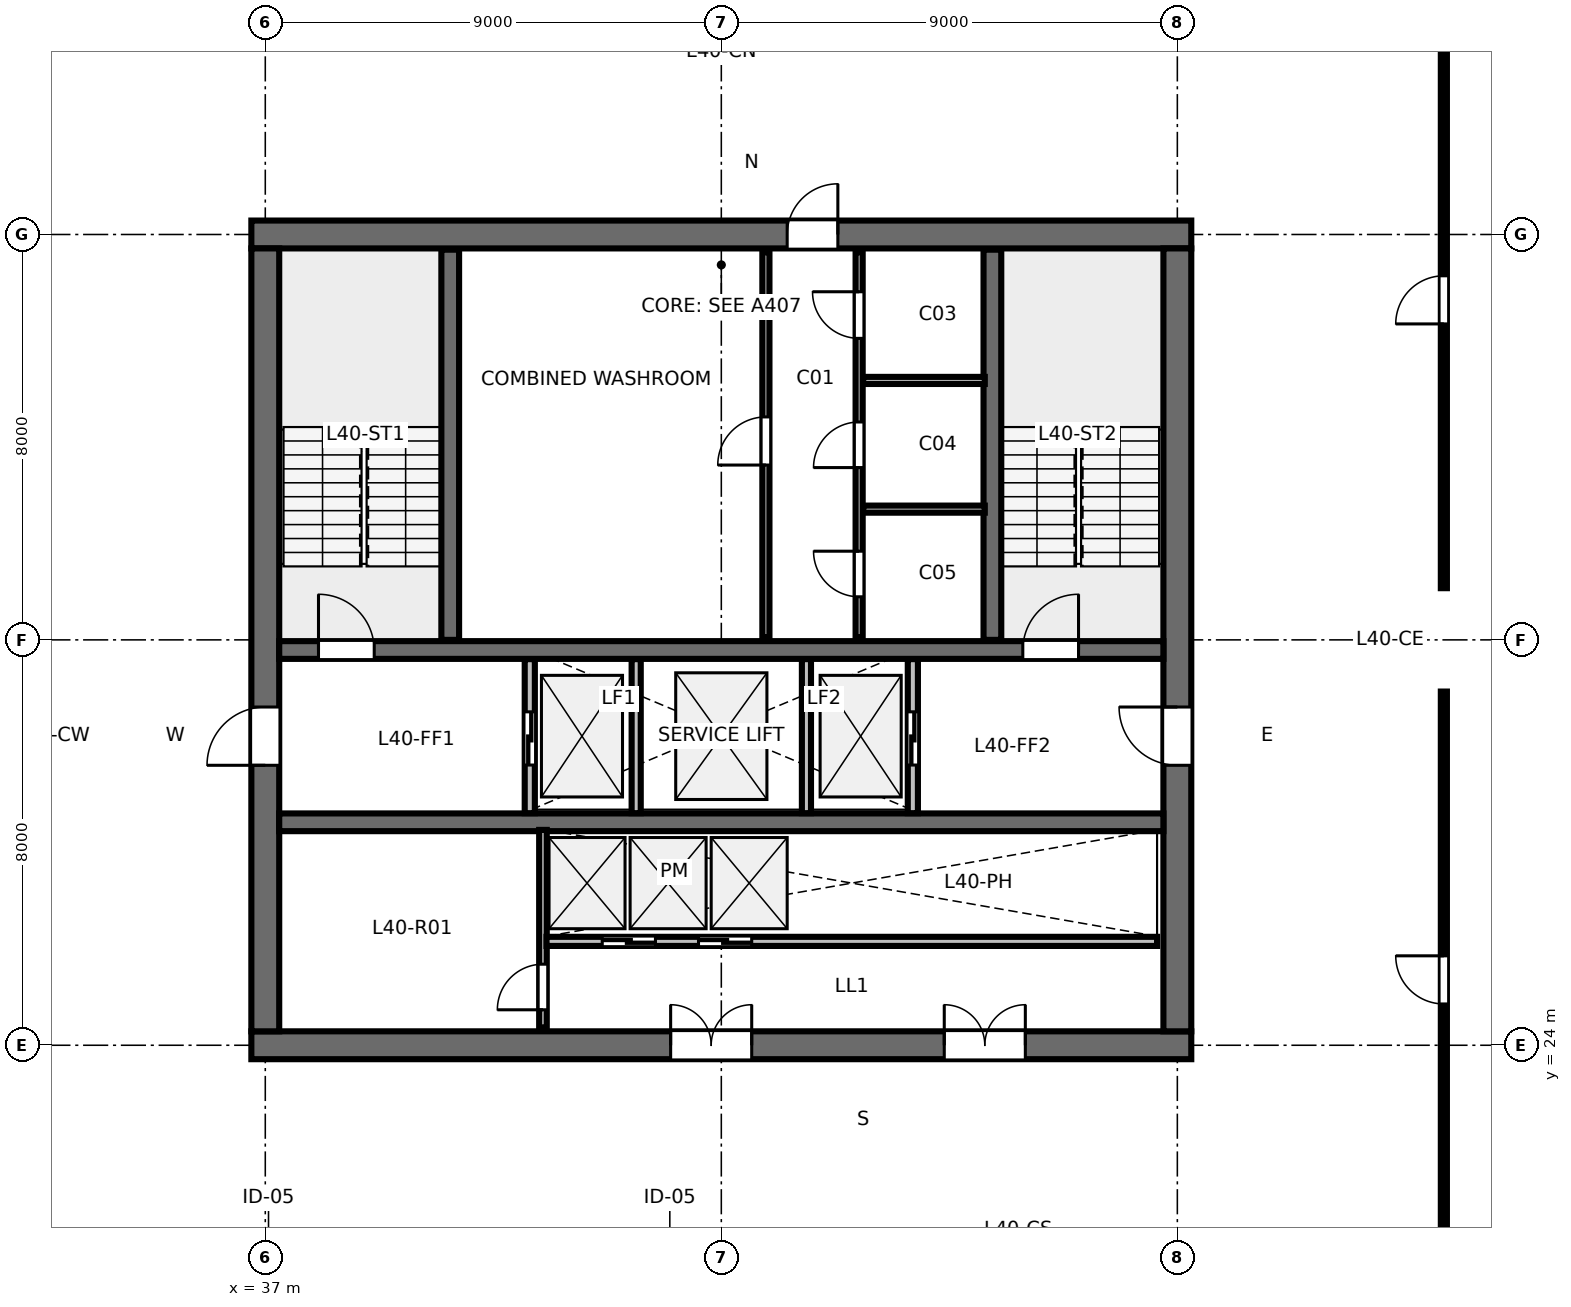
"""IFC4 building model, lengths in metres.
Left out: names, types, materials, properties, quantities, classifications, styles, units other than length and angle.
Written with IfcOpenShell. Run it as: python <this file> out.ifc"""

import sys

from ifc_helpers import new_model, si_unit, direction, frame, frame_2d, origin, place, context, subcontext, project, spatial, rectangle, extrude, element, fill, save


model = new_model("IFC4")
c1 = context("Model", 3, precision=1e-05, world=origin(), true_north=direction((0.0, 1.0)))
c2 = subcontext(c1, "Body", "Model", "MODEL_VIEW")
j1 = project(units=[si_unit("LENGTHUNIT", "METRE"), si_unit("PLANEANGLEUNIT", "RADIAN")], contexts=[c1])
p1 = place(None, origin())
s1 = spatial("IfcSite", under=j1, at=p1, CompositionType="ELEMENT")
p2 = place(p1, origin())
s2 = spatial("IfcBuilding", under=s1, at=p2, CompositionType="ELEMENT")
p3 = place(p2, frame((0.0, 0.0, 152.8)))
s3 = spatial("IfcBuildingStorey", under=s2, at=p3, CompositionType="ELEMENT", Elevation=152.8)
p4 = place(p3, frame((36.725, 24.0, 0.0), z_axis=(0.0, 0.0, 1.0), x_axis=(1.0, 0.0, 0.0)))
e1 = element("IfcWall", 1, at=p4, inside=s3, PredefinedType="SHEAR", context=c2, shape_type="SweptSolid", body=[
    extrude(rectangle(XDim=18.55, YDim=0.55, at=frame_2d((9.275, 0.0))), origin(), (0.0, 0.0, 1.0), 3.36),
])
p5 = place(p4, frame((8.275, 0.0, 0.0)))
e2 = element("IfcOpeningElement", 2, at=p5, cuts=e1, PredefinedType="OPENING", context=c2, shape_type="SweptSolid", body=[
    extrude(rectangle(XDim=1.6, YDim=2.15, at=frame_2d((0.8, 1.075))), frame((0.0, 0.285, 0.0), z_axis=(0.0, -1.0, 0.0), x_axis=(1.0, 0.0, 0.0)), (0.0, 0.0, 1.0), 0.57),
])
p6 = place(p4, frame((13.675, 0.0, 0.0)))
e3 = element("IfcOpeningElement", 3, at=p6, cuts=e1, PredefinedType="OPENING", context=c2, shape_type="SweptSolid", body=[
    extrude(rectangle(XDim=1.6, YDim=2.15, at=frame_2d((0.8, 1.075))), frame((0.0, 0.285, 0.0), z_axis=(0.0, -1.0, 0.0), x_axis=(1.0, 0.0, 0.0)), (0.0, 0.0, 1.0), 0.57),
])
p7 = place(p3, frame((36.725, 40.0, 0.0), z_axis=(0.0, 0.0, 1.0), x_axis=(1.0, 0.0, 0.0)))
e4 = element("IfcWall", 4, at=p7, inside=s3, PredefinedType="SHEAR", context=c2, shape_type="SweptSolid", body=[
    extrude(rectangle(XDim=18.55, YDim=0.55, at=frame_2d((9.275, 0.0))), origin(), (0.0, 0.0, 1.0), 3.36),
])
p8 = place(p7, frame((10.575, 0.0, 0.0)))
e5 = element("IfcOpeningElement", 5, at=p8, cuts=e4, PredefinedType="OPENING", context=c2, shape_type="SweptSolid", body=[
    extrude(rectangle(XDim=1.0, YDim=2.15, at=frame_2d((0.5, 1.075))), frame((0.0, 0.285, 0.0), z_axis=(0.0, -1.0, 0.0), x_axis=(1.0, 0.0, 0.0)), (0.0, 0.0, 1.0), 0.57),
])
p9 = place(p3, frame((37.0, 24.275, 0.0), z_axis=(0.0, 0.0, 1.0), x_axis=(0.0, 1.0, 0.0)))
e6 = element("IfcWall", 6, at=p9, inside=s3, PredefinedType="SHEAR", context=c2, shape_type="SweptSolid", body=[
    extrude(rectangle(XDim=15.45, YDim=0.55, at=frame_2d((7.725, 0.0))), origin(), (0.0, 0.0, 1.0), 3.36),
])
p10 = place(p9, frame((5.25, 0.0, 0.0)))
e7 = element("IfcOpeningElement", 7, at=p10, cuts=e6, PredefinedType="OPENING", context=c2, shape_type="SweptSolid", body=[
    extrude(rectangle(XDim=1.15, YDim=2.15, at=frame_2d((0.575, 1.075))), frame((0.0, 0.285, 0.0), z_axis=(0.0, -1.0, 0.0), x_axis=(1.0, 0.0, 0.0)), (0.0, 0.0, 1.0), 0.57),
])
p11 = place(p3, frame((55.0, 24.275, 0.0), z_axis=(0.0, 0.0, 1.0), x_axis=(0.0, 1.0, 0.0)))
e8 = element("IfcWall", 8, at=p11, inside=s3, PredefinedType="SHEAR", context=c2, shape_type="SweptSolid", body=[
    extrude(rectangle(XDim=15.45, YDim=0.55, at=frame_2d((7.725, 0.0))), origin(), (0.0, 0.0, 1.0), 3.36),
])
p12 = place(p11, frame((5.25, 0.0, 0.0)))
e9 = element("IfcOpeningElement", 9, at=p12, cuts=e8, PredefinedType="OPENING", context=c2, shape_type="SweptSolid", body=[
    extrude(rectangle(XDim=1.15, YDim=2.15, at=frame_2d((0.575, 1.075))), frame((0.0, 0.285, 0.0), z_axis=(0.0, -1.0, 0.0), x_axis=(1.0, 0.0, 0.0)), (0.0, 0.0, 1.0), 0.57),
])
p13 = place(p3, frame((37.275, 31.8, 0.0), z_axis=(0.0, 0.0, 1.0), x_axis=(1.0, 0.0, 0.0)))
e10 = element("IfcWall", 10, at=p13, inside=s3, PredefinedType="SHEAR", context=c2, shape_type="SweptSolid", body=[
    extrude(rectangle(XDim=17.45, YDim=0.35, at=frame_2d((8.725, 0.0))), origin(), (0.0, 0.0, 1.0), 3.36),
])
p14 = place(p13, frame((0.775, 0.0, 0.0)))
e11 = element("IfcOpeningElement", 11, at=p14, cuts=e10, PredefinedType="OPENING", context=c2, shape_type="SweptSolid", body=[
    extrude(rectangle(XDim=1.1, YDim=2.15, at=frame_2d((0.55, 1.075))), frame((0.0, 0.185, 0.0), z_axis=(0.0, -1.0, 0.0), x_axis=(1.0, 0.0, 0.0)), (0.0, 0.0, 1.0), 0.37),
])
p15 = place(p13, frame((14.675, 0.0, 0.0)))
e12 = element("IfcOpeningElement", 12, at=p15, cuts=e10, PredefinedType="OPENING", context=c2, shape_type="SweptSolid", body=[
    extrude(rectangle(XDim=1.1, YDim=2.15, at=frame_2d((0.55, 1.075))), frame((0.0, 0.185, 0.0), z_axis=(0.0, -1.0, 0.0), x_axis=(1.0, 0.0, 0.0)), (0.0, 0.0, 1.0), 0.37),
])
p16 = place(p3, frame((37.275, 28.4, 0.0), z_axis=(0.0, 0.0, 1.0), x_axis=(1.0, 0.0, 0.0)))
e13 = element("IfcWall", 13, at=p16, inside=s3, PredefinedType="SHEAR", context=c2, shape_type="SweptSolid", body=[
    extrude(rectangle(XDim=17.45, YDim=0.35, at=frame_2d((8.725, 0.0))), origin(), (0.0, 0.0, 1.0), 3.36),
])
for number, where, z_axis, x_axis in (
    (14, (40.65, 32.0, 0.0), (0.0, 0.0, 1.0), (0.0, 1.0, 0.0)),
    (15, (51.35, 32.0, 0.0), (0.0, 0.0, 1.0), (0.0, 1.0, 0.0)),
):
    element("IfcWall", number, at=place(p3, frame(where, z_axis=z_axis, x_axis=x_axis)), inside=s3, PredefinedType="SHEAR", context=c2, shape_type="SweptSolid", body=[
        extrude(rectangle(XDim=7.7, YDim=0.35, at=frame_2d((3.85, 0.0))), origin(), (0.0, 0.0, 1.0), 3.6),
    ])
p17 = place(p3, frame((46.88, 32.05, 0.0), z_axis=(0.0, 0.0, 1.0), x_axis=(0.0, 1.0, 0.0)))
e16 = element("IfcWall", 16, at=p17, inside=s3, PredefinedType="PARTITIONING", context=c2, shape_type="SweptSolid", body=[
    extrude(rectangle(XDim=7.6, YDim=0.14, at=frame_2d((3.8, 0.0))), origin(), (0.0, 0.0, 1.0), 3.36),
])
p18 = place(p17, frame((3.4, 0.0, 0.0)))
e17 = element("IfcOpeningElement", 17, at=p18, cuts=e16, PredefinedType="OPENING", context=c2, shape_type="SweptSolid", body=[
    extrude(rectangle(XDim=0.95, YDim=2.15, at=frame_2d((0.475, 1.075))), frame((0.0, 0.08, 0.0), z_axis=(0.0, -1.0, 0.0), x_axis=(1.0, 0.0, 0.0)), (0.0, 0.0, 1.0), 0.16),
])
p19 = place(p3, frame((48.72, 32.05, 0.0), z_axis=(0.0, 0.0, 1.0), x_axis=(0.0, 1.0, 0.0)))
e18 = element("IfcWall", 18, at=p19, inside=s3, PredefinedType="PARTITIONING", context=c2, shape_type="SweptSolid", body=[
    extrude(rectangle(XDim=7.6, YDim=0.14, at=frame_2d((3.8, 0.0))), origin(), (0.0, 0.0, 1.0), 3.36),
])
p20 = place(p19, frame((0.8, 0.0, 0.0)))
e19 = element("IfcOpeningElement", 19, at=p20, cuts=e18, PredefinedType="OPENING", context=c2, shape_type="SweptSolid", body=[
    extrude(rectangle(XDim=0.9, YDim=2.15, at=frame_2d((0.45, 1.075))), frame((0.0, 0.08, 0.0), z_axis=(0.0, -1.0, 0.0), x_axis=(1.0, 0.0, 0.0)), (0.0, 0.0, 1.0), 0.16),
])
p21 = place(p19, frame((3.35, 0.0, 0.0)))
e20 = element("IfcOpeningElement", 20, at=p21, cuts=e18, PredefinedType="OPENING", context=c2, shape_type="SweptSolid", body=[
    extrude(rectangle(XDim=0.9, YDim=2.15, at=frame_2d((0.45, 1.075))), frame((0.0, 0.08, 0.0), z_axis=(0.0, -1.0, 0.0), x_axis=(1.0, 0.0, 0.0)), (0.0, 0.0, 1.0), 0.16),
])
p22 = place(p19, frame((5.9, 0.0, 0.0)))
e21 = element("IfcOpeningElement", 21, at=p22, cuts=e18, PredefinedType="OPENING", context=c2, shape_type="SweptSolid", body=[
    extrude(rectangle(XDim=0.92, YDim=2.15, at=frame_2d((0.46, 1.075))), frame((0.0, 0.08, 0.0), z_axis=(0.0, -1.0, 0.0), x_axis=(1.0, 0.0, 0.0)), (0.0, 0.0, 1.0), 0.16),
])
for number, where, z_axis, x_axis in (
    (22, (48.8, 34.58, 0.0), (0.0, 0.0, 1.0), (1.0, 0.0, 0.0)),
    (23, (48.8, 37.12, 0.0), (0.0, 0.0, 1.0), (1.0, 0.0, 0.0)),
):
    element("IfcWall", number, at=place(p3, frame(where, z_axis=z_axis, x_axis=x_axis)), inside=s3, PredefinedType="PARTITIONING", context=c2, shape_type="SweptSolid", body=[
        extrude(rectangle(XDim=2.4, YDim=0.14, at=frame_2d((1.2, 0.0))), origin(), (0.0, 0.0, 1.0), 3.36),
    ])
p23 = place(p3, frame((42.22, 28.58, 0.0), z_axis=(0.0, 0.0, 1.0), x_axis=(0.0, 1.0, 0.0)))
e24 = element("IfcWall", 24, at=p23, inside=s3, PredefinedType="PARTITIONING", context=c2, shape_type="SweptSolid", body=[
    extrude(rectangle(XDim=3.04, YDim=0.2, at=frame_2d((1.52, 0.0))), origin(), (0.0, 0.0, 1.0), 3.36),
])
p24 = place(p23, frame((0.95, 0.0, 0.0)))
e25 = element("IfcOpeningElement", 25, at=p24, cuts=e24, PredefinedType="OPENING", context=c2, shape_type="SweptSolid", body=[
    extrude(rectangle(XDim=1.05, YDim=2.15, at=frame_2d((0.525, 1.075))), frame((0.0, 0.11, 0.0), z_axis=(0.0, -1.0, 0.0), x_axis=(1.0, 0.0, 0.0)), (0.0, 0.0, 1.0), 0.22),
])
p25 = place(p3, frame((49.78, 28.58, 0.0), z_axis=(0.0, 0.0, 1.0), x_axis=(0.0, 1.0, 0.0)))
e26 = element("IfcWall", 26, at=p25, inside=s3, PredefinedType="PARTITIONING", context=c2, shape_type="SweptSolid", body=[
    extrude(rectangle(XDim=3.04, YDim=0.2, at=frame_2d((1.52, 0.0))), origin(), (0.0, 0.0, 1.0), 3.36),
])
p26 = place(p25, frame((0.95, 0.0, 0.0)))
e27 = element("IfcOpeningElement", 27, at=p26, cuts=e26, PredefinedType="OPENING", context=c2, shape_type="SweptSolid", body=[
    extrude(rectangle(XDim=1.05, YDim=2.15, at=frame_2d((0.525, 1.075))), frame((0.0, 0.11, 0.0), z_axis=(0.0, -1.0, 0.0), x_axis=(1.0, 0.0, 0.0)), (0.0, 0.0, 1.0), 0.22),
])
for number, where, z_axis, x_axis in (
    (28, (44.32, 28.58, 0.0), (0.0, 0.0, 1.0), (0.0, 1.0, 0.0)),
    (29, (47.68, 28.58, 0.0), (0.0, 0.0, 1.0), (0.0, 1.0, 0.0)),
):
    element("IfcWall", number, at=place(p3, frame(where, z_axis=z_axis, x_axis=x_axis)), inside=s3, PredefinedType="PARTITIONING", context=c2, shape_type="SweptSolid", body=[
        extrude(rectangle(XDim=3.04, YDim=0.18, at=frame_2d((1.52, 0.0))), origin(), (0.0, 0.0, 1.0), 3.36),
    ])
p27 = place(p3, frame((42.48, 24.35, 0.0), z_axis=(0.0, 0.0, 1.0), x_axis=(0.0, 1.0, 0.0)))
e30 = element("IfcWall", 30, at=p27, inside=s3, PredefinedType="PARTITIONING", context=c2, shape_type="SweptSolid", body=[
    extrude(rectangle(XDim=3.9, YDim=0.15, at=frame_2d((1.95, 0.0))), origin(), (0.0, 0.0, 1.0), 3.36),
])
p28 = place(p27, frame((0.35, 0.0, 0.0)))
e31 = element("IfcOpeningElement", 31, at=p28, cuts=e30, PredefinedType="OPENING", context=c2, shape_type="SweptSolid", body=[
    extrude(rectangle(XDim=0.9, YDim=2.15, at=frame_2d((0.45, 1.075))), frame((0.0, 0.085, 0.0), z_axis=(0.0, -1.0, 0.0), x_axis=(1.0, 0.0, 0.0)), (0.0, 0.0, 1.0), 0.17),
])
p29 = place(p3, frame((42.55, 26.05, 0.0), z_axis=(0.0, 0.0, 1.0), x_axis=(1.0, 0.0, 0.0)))
e32 = element("IfcWall", 32, at=p29, inside=s3, PredefinedType="PARTITIONING", context=c2, shape_type="SweptSolid", body=[
    extrude(rectangle(XDim=12.05, YDim=0.18, at=frame_2d((6.025, 0.0))), origin(), (0.0, 0.0, 1.0), 3.36),
])
p30 = place(p29, frame((1.1, 0.0, 0.0)))
e33 = element("IfcOpeningElement", 33, at=p30, cuts=e32, PredefinedType="OPENING", context=c2, shape_type="SweptSolid", body=[
    extrude(rectangle(XDim=1.05, YDim=2.15, at=frame_2d((0.525, 1.075))), frame((0.0, 0.1, 0.0), z_axis=(0.0, -1.0, 0.0), x_axis=(1.0, 0.0, 0.0)), (0.0, 0.0, 1.0), 0.2),
])
p31 = place(p29, frame((3.0, 0.0, 0.0)))
e34 = element("IfcOpeningElement", 34, at=p31, cuts=e32, PredefinedType="OPENING", context=c2, shape_type="SweptSolid", body=[
    extrude(rectangle(XDim=1.05, YDim=2.15, at=frame_2d((0.525, 1.075))), frame((0.0, 0.1, 0.0), z_axis=(0.0, -1.0, 0.0), x_axis=(1.0, 0.0, 0.0)), (0.0, 0.0, 1.0), 0.2),
])
p32 = place(p3, frame((60.26, 19.4, 0.0), z_axis=(0.0, 0.0, 1.0), x_axis=(0.0, 1.0, 0.0)))
e35 = element("IfcWall", 35, at=p32, inside=s3, PredefinedType="PARTITIONING", context=c2, shape_type="SweptSolid", body=[
    extrude(rectangle(XDim=11.58, YDim=0.12, at=frame_2d((5.79, 0.0))), origin(), (0.0, 0.0, 1.0), 2.64),
])
p33 = place(p32, frame((5.415, 0.0, 0.0)))
e36 = element("IfcOpeningElement", 36, at=p33, cuts=e35, PredefinedType="OPENING", context=c2, shape_type="SweptSolid", body=[
    extrude(rectangle(XDim=0.95, YDim=2.15, at=frame_2d((0.475, 1.075))), frame((0.0, 0.07, 0.0), z_axis=(0.0, -1.0, 0.0), x_axis=(1.0, 0.0, 0.0)), (0.0, 0.0, 1.0), 0.14),
])
p34 = place(p3, frame((60.26, 33.02, 0.0), z_axis=(0.0, 0.0, 1.0), x_axis=(0.0, 1.0, 0.0)))
e37 = element("IfcWall", 37, at=p34, inside=s3, PredefinedType="PARTITIONING", context=c2, shape_type="SweptSolid", body=[
    extrude(rectangle(XDim=11.58, YDim=0.12, at=frame_2d((5.79, 0.0))), origin(), (0.0, 0.0, 1.0), 2.64),
])
p35 = place(p34, frame((5.215, 0.0, 0.0)))
e38 = element("IfcOpeningElement", 38, at=p35, cuts=e37, PredefinedType="OPENING", context=c2, shape_type="SweptSolid", body=[
    extrude(rectangle(XDim=0.95, YDim=2.15, at=frame_2d((0.475, 1.075))), frame((0.0, 0.07, 0.0), z_axis=(0.0, -1.0, 0.0), x_axis=(1.0, 0.0, 0.0)), (0.0, 0.0, 1.0), 0.14),
])
p36 = place(p14, origin())
e39 = element("IfcDoor", 39, at=p36, inside=s3, OperationType="SINGLE_SWING_LEFT", PredefinedType="DOOR", context=c2, shape_type="SweptSolid", body=[
    extrude(rectangle(XDim=1.1, YDim=2.15, at=frame_2d((0.55, 1.075))), frame((0.0, 0.025, 0.0), z_axis=(0.0, -1.0, 0.0), x_axis=(1.0, 0.0, 0.0)), (0.0, 0.0, 1.0), 0.05),
])
fill(e11, e39)
p37 = place(p15, origin())
e40 = element("IfcDoor", 40, at=p37, inside=s3, OperationType="SINGLE_SWING_RIGHT", PredefinedType="DOOR", context=c2, shape_type="SweptSolid", body=[
    extrude(rectangle(XDim=1.1, YDim=2.15, at=frame_2d((0.55, 1.075))), frame((0.0, 0.025, 0.0), z_axis=(0.0, -1.0, 0.0), x_axis=(1.0, 0.0, 0.0)), (0.0, 0.0, 1.0), 0.05),
])
fill(e12, e40)
p38 = place(p8, origin())
e41 = element("IfcDoor", 41, at=p38, inside=s3, OperationType="SINGLE_SWING_RIGHT", PredefinedType="DOOR", context=c2, shape_type="SweptSolid", body=[
    extrude(rectangle(XDim=1.0, YDim=2.15, at=frame_2d((0.5, 1.075))), frame((0.0, 0.025, 0.0), z_axis=(0.0, -1.0, 0.0), x_axis=(1.0, 0.0, 0.0)), (0.0, 0.0, 1.0), 0.05),
])
fill(e5, e41)
p39 = place(p10, origin())
e42 = element("IfcDoor", 42, at=p39, inside=s3, OperationType="SINGLE_SWING_LEFT", PredefinedType="DOOR", context=c2, shape_type="SweptSolid", body=[
    extrude(rectangle(XDim=1.15, YDim=2.15, at=frame_2d((0.575, 1.075))), frame((0.0, 0.025, 0.0), z_axis=(0.0, -1.0, 0.0), x_axis=(1.0, 0.0, 0.0)), (0.0, 0.0, 1.0), 0.05),
])
fill(e7, e42)
p40 = place(p12, origin())
e43 = element("IfcDoor", 43, at=p40, inside=s3, OperationType="SINGLE_SWING_RIGHT", PredefinedType="DOOR", context=c2, shape_type="SweptSolid", body=[
    extrude(rectangle(XDim=1.15, YDim=2.15, at=frame_2d((0.575, 1.075))), frame((0.0, 0.025, 0.0), z_axis=(0.0, -1.0, 0.0), x_axis=(1.0, 0.0, 0.0)), (0.0, 0.0, 1.0), 0.05),
])
fill(e9, e43)
p41 = place(p5, origin())
e44 = element("IfcDoor", 44, at=p41, inside=s3, OperationType="DOUBLE_DOOR_SINGLE_SWING", PredefinedType="DOOR", context=c2, shape_type="SweptSolid", body=[
    extrude(rectangle(XDim=1.6, YDim=2.15, at=frame_2d((0.8, 1.075))), frame((0.0, 0.025, 0.0), z_axis=(0.0, -1.0, 0.0), x_axis=(1.0, 0.0, 0.0)), (0.0, 0.0, 1.0), 0.05),
])
fill(e2, e44)
p42 = place(p6, origin())
e45 = element("IfcDoor", 45, at=p42, inside=s3, OperationType="DOUBLE_DOOR_SINGLE_SWING", PredefinedType="DOOR", context=c2, shape_type="SweptSolid", body=[
    extrude(rectangle(XDim=1.6, YDim=2.15, at=frame_2d((0.8, 1.075))), frame((0.0, 0.025, 0.0), z_axis=(0.0, -1.0, 0.0), x_axis=(1.0, 0.0, 0.0)), (0.0, 0.0, 1.0), 0.05),
])
fill(e3, e45)
p43 = place(p18, origin())
e46 = element("IfcDoor", 46, at=p43, inside=s3, OperationType="SINGLE_SWING_LEFT", PredefinedType="DOOR", context=c2, shape_type="SweptSolid", body=[
    extrude(rectangle(XDim=0.95, YDim=2.15, at=frame_2d((0.475, 1.075))), frame((0.0, 0.025, 0.0), z_axis=(0.0, -1.0, 0.0), x_axis=(1.0, 0.0, 0.0)), (0.0, 0.0, 1.0), 0.05),
])
fill(e17, e46)
p44 = place(p20, origin())
e47 = element("IfcDoor", 47, at=p44, inside=s3, OperationType="SINGLE_SWING_RIGHT", PredefinedType="DOOR", context=c2, shape_type="SweptSolid", body=[
    extrude(rectangle(XDim=0.9, YDim=2.15, at=frame_2d((0.45, 1.075))), frame((0.0, 0.025, 0.0), z_axis=(0.0, -1.0, 0.0), x_axis=(1.0, 0.0, 0.0)), (0.0, 0.0, 1.0), 0.05),
])
fill(e19, e47)
p45 = place(p21, origin())
e48 = element("IfcDoor", 48, at=p45, inside=s3, OperationType="SINGLE_SWING_LEFT", PredefinedType="DOOR", context=c2, shape_type="SweptSolid", body=[
    extrude(rectangle(XDim=0.9, YDim=2.15, at=frame_2d((0.45, 1.075))), frame((0.0, 0.025, 0.0), z_axis=(0.0, -1.0, 0.0), x_axis=(1.0, 0.0, 0.0)), (0.0, 0.0, 1.0), 0.05),
])
fill(e20, e48)
p46 = place(p22, origin())
e49 = element("IfcDoor", 49, at=p46, inside=s3, OperationType="SINGLE_SWING_RIGHT", PredefinedType="DOOR", context=c2, shape_type="SweptSolid", body=[
    extrude(rectangle(XDim=0.92, YDim=2.15, at=frame_2d((0.46, 1.075))), frame((0.0, 0.025, 0.0), z_axis=(0.0, -1.0, 0.0), x_axis=(1.0, 0.0, 0.0)), (0.0, 0.0, 1.0), 0.05),
])
fill(e21, e49)
p47 = place(p24, origin())
e50 = element("IfcDoor", 50, at=p47, inside=s3, OperationType="SLIDING_TO_LEFT", PredefinedType="DOOR", context=c2, shape_type="SweptSolid", body=[
    extrude(rectangle(XDim=1.05, YDim=2.15, at=frame_2d((0.525, 1.075))), frame((0.0, 0.025, 0.0), z_axis=(0.0, -1.0, 0.0), x_axis=(1.0, 0.0, 0.0)), (0.0, 0.0, 1.0), 0.05),
])
fill(e25, e50)
p48 = place(p26, origin())
e51 = element("IfcDoor", 51, at=p48, inside=s3, OperationType="SLIDING_TO_RIGHT", PredefinedType="DOOR", context=c2, shape_type="SweptSolid", body=[
    extrude(rectangle(XDim=1.05, YDim=2.15, at=frame_2d((0.525, 1.075))), frame((0.0, 0.025, 0.0), z_axis=(0.0, -1.0, 0.0), x_axis=(1.0, 0.0, 0.0)), (0.0, 0.0, 1.0), 0.05),
])
fill(e27, e51)
p49 = place(p28, origin())
e52 = element("IfcDoor", 52, at=p49, inside=s3, OperationType="SINGLE_SWING_LEFT", PredefinedType="DOOR", context=c2, shape_type="SweptSolid", body=[
    extrude(rectangle(XDim=0.9, YDim=2.15, at=frame_2d((0.45, 1.075))), frame((0.0, 0.025, 0.0), z_axis=(0.0, -1.0, 0.0), x_axis=(1.0, 0.0, 0.0)), (0.0, 0.0, 1.0), 0.05),
])
fill(e31, e52)
p50 = place(p30, origin())
e53 = element("IfcDoor", 53, at=p50, inside=s3, OperationType="SLIDING_TO_LEFT", PredefinedType="DOOR", context=c2, shape_type="SweptSolid", body=[
    extrude(rectangle(XDim=1.05, YDim=2.15, at=frame_2d((0.525, 1.075))), frame((0.0, 0.025, 0.0), z_axis=(0.0, -1.0, 0.0), x_axis=(1.0, 0.0, 0.0)), (0.0, 0.0, 1.0), 0.05),
])
fill(e33, e53)
p51 = place(p31, origin())
e54 = element("IfcDoor", 54, at=p51, inside=s3, OperationType="SLIDING_TO_RIGHT", PredefinedType="DOOR", context=c2, shape_type="SweptSolid", body=[
    extrude(rectangle(XDim=1.05, YDim=2.15, at=frame_2d((0.525, 1.075))), frame((0.0, 0.025, 0.0), z_axis=(0.0, -1.0, 0.0), x_axis=(1.0, 0.0, 0.0)), (0.0, 0.0, 1.0), 0.05),
])
fill(e34, e54)
p52 = place(p33, origin())
e55 = element("IfcDoor", 55, at=p52, inside=s3, OperationType="SINGLE_SWING_RIGHT", PredefinedType="DOOR", context=c2, shape_type="SweptSolid", body=[
    extrude(rectangle(XDim=0.95, YDim=2.15, at=frame_2d((0.475, 1.075))), frame((0.0, 0.025, 0.0), z_axis=(0.0, -1.0, 0.0), x_axis=(1.0, 0.0, 0.0)), (0.0, 0.0, 1.0), 0.05),
])
fill(e36, e55)
p53 = place(p35, origin())
e56 = element("IfcDoor", 56, at=p53, inside=s3, OperationType="SINGLE_SWING_LEFT", PredefinedType="DOOR", context=c2, shape_type="SweptSolid", body=[
    extrude(rectangle(XDim=0.95, YDim=2.15, at=frame_2d((0.475, 1.075))), frame((0.0, 0.025, 0.0), z_axis=(0.0, -1.0, 0.0), x_axis=(1.0, 0.0, 0.0)), (0.0, 0.0, 1.0), 0.05),
])
fill(e38, e56)
save(model, sys.argv[1])
